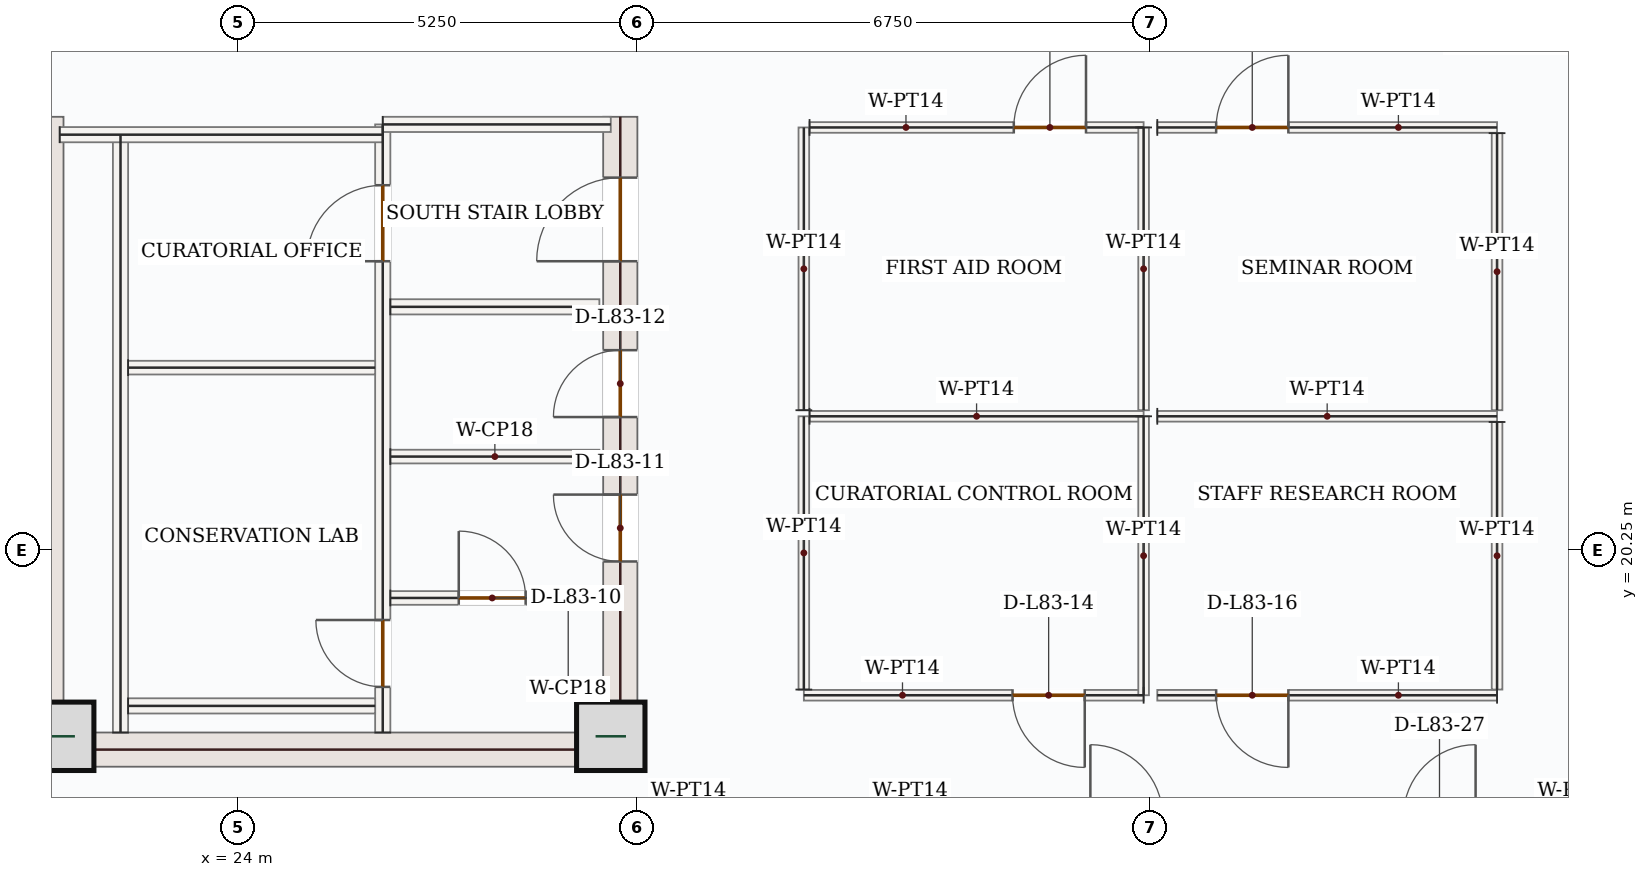
"""IFC4 building model, lengths in metres.
Left out: names, types, materials, properties, quantities, classifications, styles, units other than length and angle.
Written with IfcOpenShell. Run it as: python <this file> out.ifc"""

import sys

from ifc_helpers import new_model, si_unit, direction, frame, frame_2d, origin, origin_2d, place, context, subcontext, project, spatial, rectangle, extrude, source, transform, mapped, element, fill, save


model = new_model("IFC4")
c1 = context("Model", 3, precision=1e-05, world=origin(), true_north=direction((0.0, 1.0)))
c2 = subcontext(c1, "Body", "Model", "MODEL_VIEW")
j1 = project(units=[si_unit("LENGTHUNIT", "METRE"), si_unit("PLANEANGLEUNIT", "RADIAN")], contexts=[c1])
p1 = place(None, origin())
s1 = spatial("IfcSite", under=j1, at=p1, CompositionType="ELEMENT")
p2 = place(p1, origin())
s2 = spatial("IfcBuilding", under=s1, at=p2, CompositionType="ELEMENT")
p3 = place(p2, frame((0.0, 0.0, 342.3)))
s3 = spatial("IfcBuildingStorey", under=s2, at=p3, CompositionType="ELEMENT", Elevation=342.3)
m1 = source(origin(), c2, "Body", "SweptSolid", [
    extrude(rectangle(XDim=8.55, YDim=0.45, at=frame_2d((4.275, 0.0))), origin(), (0.0, 0.0, 1.0), 3.5),
])
p4 = place(p3, frame((21.475, 17.4, 0.0), z_axis=(0.0, 0.0, 1.0), x_axis=(0.0, 1.0, 0.0)))
e1 = element("IfcWall", 1, at=p4, inside=s3, PredefinedType="SHEAR", context=c2, shape_type="MappedRepresentation", body=[
    mapped(m1, transform((0.0, 0.0, 0.0), x_axis=(1.0, 0.0, 0.0), y_axis=(0.0, 1.0, 0.0), z_axis=(0.0, 0.0, 1.0), scale=1.0)),
])
p5 = place(p3, frame((29.025, 17.4, 0.0), z_axis=(0.0, 0.0, 1.0), x_axis=(0.0, 1.0, 0.0)))
e2 = element("IfcWall", 2, at=p5, inside=s3, PredefinedType="SHEAR", context=c2, shape_type="SweptSolid", body=[
    extrude(rectangle(XDim=8.55, YDim=0.45, at=frame_2d((4.275, 0.0))), origin(), (0.0, 0.0, 1.0), 3.5),
])
p6 = place(p5, frame((6.65, 0.0, 0.0)))
e3 = element("IfcOpeningElement", 3, at=p6, cuts=e2, PredefinedType="OPENING", context=c2, shape_type="SweptSolid", body=[
    extrude(rectangle(XDim=1.1, YDim=2.2, at=frame_2d((0.55, 1.1))), frame((0.0, 0.235, 0.0), z_axis=(0.0, -1.0, 0.0), x_axis=(1.0, 0.0, 0.0)), (0.0, 0.0, 1.0), 0.47),
])
p7 = place(p5, frame((2.7, 0.0, 0.0)))
e4 = element("IfcOpeningElement", 4, at=p7, cuts=e2, PredefinedType="OPENING", context=c2, shape_type="SweptSolid", body=[
    extrude(rectangle(XDim=0.88, YDim=2.1, at=frame_2d((0.44, 1.05))), frame((0.0, 0.235, 0.0), z_axis=(0.0, -1.0, 0.0), x_axis=(1.0, 0.0, 0.0)), (0.0, 0.0, 1.0), 0.47),
])
p8 = place(p5, frame((4.6, 0.0, 0.0)))
e5 = element("IfcOpeningElement", 5, at=p8, cuts=e2, PredefinedType="OPENING", context=c2, shape_type="SweptSolid", body=[
    extrude(rectangle(XDim=0.88, YDim=2.1, at=frame_2d((0.44, 1.05))), frame((0.0, 0.235, 0.0), z_axis=(0.0, -1.0, 0.0), x_axis=(1.0, 0.0, 0.0)), (0.0, 0.0, 1.0), 0.47),
])
m2 = source(origin(), c2, "Body", "SweptSolid", [
    extrude(rectangle(XDim=7.1, YDim=0.45, at=frame_2d((3.55, 0.0))), origin(), (0.0, 0.0, 1.0), 3.5),
])
p9 = place(p3, frame((21.7, 17.625, 0.0), z_axis=(0.0, 0.0, 1.0), x_axis=(1.0, 0.0, 0.0)))
e6 = element("IfcWall", 6, at=p9, inside=s3, PredefinedType="SHEAR", context=c2, shape_type="MappedRepresentation", body=[
    mapped(m2, transform((0.0, 0.0, 0.0), x_axis=(1.0, 0.0, 0.0), y_axis=(0.0, 1.0, 0.0), z_axis=(0.0, 0.0, 1.0), scale=1.0)),
])
m3 = source(origin(), c2, "Body", "SweptSolid", [
    extrude(rectangle(XDim=0.9, YDim=0.9, at=origin_2d()), origin(), (0.0, 0.0, 1.0), 3.75),
])
for number, where, z_axis, x_axis in (
    (7, (21.65, 17.8, 0.0), (0.0, 0.0, 1.0), (1.0, 0.0, 0.0)),
    (8, (28.9, 17.8, 0.0), (0.0, 0.0, 1.0), (1.0, 0.0, 0.0)),
):
    element("IfcColumn", number, at=place(p3, frame(where, z_axis=z_axis, x_axis=x_axis)), inside=s3, PredefinedType="COLUMN", context=c2, shape_type="MappedRepresentation", body=[
        mapped(m3, transform((0.0, 0.0, 0.0), x_axis=(1.0, 0.0, 0.0), y_axis=(0.0, 1.0, 0.0), z_axis=(0.0, 0.0, 1.0), scale=1.0)),
    ])
p10 = place(p3, frame((22.167, 14.994, 0.0), z_axis=(0.0, 0.0, 1.0), x_axis=(-0.681733754317, 0.731600361006, 0.0)))
e9 = element("IfcWall", 9, at=p10, inside=s3, PredefinedType="SOLIDWALL", context=c2, shape_type="SweptSolid", body=[
    extrude(rectangle(XDim=4.734, YDim=0.28, at=frame_2d((2.367, 0.0))), origin(), (0.0, 0.0, 1.0), 3.5),
])
p11 = place(p10, frame((1.617, 0.0, 0.85)))
e10 = element("IfcOpeningElement", 10, at=p11, cuts=e9, PredefinedType="OPENING", context=c2, shape_type="SweptSolid", body=[
    extrude(rectangle(XDim=1.5, YDim=1.5, at=frame_2d((0.75, 0.75))), frame((0.0, 0.15, 0.0), z_axis=(0.0, -1.0, 0.0), x_axis=(1.0, 0.0, 0.0)), (0.0, 0.0, 1.0), 0.3),
])
m4 = source(origin(), c2, "Body", "SweptSolid", [
    extrude(rectangle(XDim=7.87, YDim=0.2, at=frame_2d((3.935, 0.0))), origin(), (0.0, 0.0, 1.0), 3.5),
])
p12 = place(p3, frame((22.45, 17.85, 0.0), z_axis=(0.0, 0.0, 1.0), x_axis=(0.0, 1.0, 0.0)))
e11 = element("IfcWall", 11, at=p12, inside=s3, PredefinedType="SOLIDWALL", context=c2, shape_type="MappedRepresentation", body=[
    mapped(m4, transform((0.0, 0.0, 0.0), x_axis=(1.0, 0.0, 0.0), y_axis=(0.0, 1.0, 0.0), z_axis=(0.0, 0.0, 1.0), scale=1.0)),
])
p13 = place(p3, frame((25.9, 17.85, 0.0), z_axis=(0.0, 0.0, 1.0), x_axis=(0.0, 1.0, 0.0)))
e12 = element("IfcWall", 12, at=p13, inside=s3, PredefinedType="SOLIDWALL", context=c2, shape_type="SweptSolid", body=[
    extrude(rectangle(XDim=8.0, YDim=0.2, at=frame_2d((4.0, 0.0))), origin(), (0.0, 0.0, 1.0), 3.5),
])
p14 = place(p13, frame((6.2, 0.0, 0.0)))
e13 = element("IfcOpeningElement", 13, at=p14, cuts=e12, PredefinedType="OPENING", context=c2, shape_type="SweptSolid", body=[
    extrude(rectangle(XDim=1.0, YDim=2.15, at=frame_2d((0.5, 1.075))), frame((0.0, 0.11, 0.0), z_axis=(0.0, -1.0, 0.0), x_axis=(1.0, 0.0, 0.0)), (0.0, 0.0, 1.0), 0.22),
])
p15 = place(p13, frame((0.6, 0.0, 0.0)))
e14 = element("IfcOpeningElement", 14, at=p15, cuts=e12, PredefinedType="OPENING", context=c2, shape_type="SweptSolid", body=[
    extrude(rectangle(XDim=0.88, YDim=2.1, at=frame_2d((0.44, 1.05))), frame((0.0, 0.11, 0.0), z_axis=(0.0, -1.0, 0.0), x_axis=(1.0, 0.0, 0.0)), (0.0, 0.0, 1.0), 0.22),
])
m5 = source(origin(), c2, "Body", "SweptSolid", [
    extrude(rectangle(XDim=4.25, YDim=0.2, at=frame_2d((2.125, 0.0))), origin(), (0.0, 0.0, 1.0), 3.5),
])
p16 = place(p3, frame((21.65, 25.715, 0.0), z_axis=(0.0, 0.0, 1.0), x_axis=(1.0, 0.0, 0.0)))
e15 = element("IfcWall", 15, at=p16, inside=s3, PredefinedType="SOLIDWALL", context=c2, shape_type="MappedRepresentation", body=[
    mapped(m5, transform((0.0, 0.0, 0.0), x_axis=(1.0, 0.0, 0.0), y_axis=(0.0, 1.0, 0.0), z_axis=(0.0, 0.0, 1.0), scale=1.0)),
])
m6 = source(origin(), c2, "Body", "SweptSolid", [
    extrude(rectangle(XDim=3.0, YDim=0.2, at=frame_2d((1.5, 0.0))), origin(), (0.0, 0.0, 1.0), 3.5),
])
p17 = place(p3, frame((25.9, 25.85, 0.0), z_axis=(0.0, 0.0, 1.0), x_axis=(1.0, 0.0, 0.0)))
e16 = element("IfcWall", 16, at=p17, inside=s3, PredefinedType="SOLIDWALL", context=c2, shape_type="MappedRepresentation", body=[
    mapped(m6, transform((0.0, 0.0, 0.0), x_axis=(1.0, 0.0, 0.0), y_axis=(0.0, 1.0, 0.0), z_axis=(0.0, 0.0, 1.0), scale=1.0)),
])
m7 = source(origin(), c2, "Body", "SweptSolid", [
    extrude(rectangle(XDim=3.25, YDim=0.2, at=frame_2d((1.625, 0.0))), origin(), (0.0, 0.0, 1.0), 3.5),
])
p18 = place(p3, frame((22.55, 18.2, 0.0), z_axis=(0.0, 0.0, 1.0), x_axis=(1.0, 0.0, 0.0)))
e17 = element("IfcWall", 17, at=p18, inside=s3, PredefinedType="SOLIDWALL", context=c2, shape_type="MappedRepresentation", body=[
    mapped(m7, transform((0.0, 0.0, 0.0), x_axis=(1.0, 0.0, 0.0), y_axis=(0.0, 1.0, 0.0), z_axis=(0.0, 0.0, 1.0), scale=1.0)),
])
m8 = source(origin(), c2, "Body", "SweptSolid", [
    extrude(rectangle(XDim=3.25, YDim=0.18, at=frame_2d((1.625, 0.0))), origin(), (0.0, 0.0, 1.0), 3.5),
])
p19 = place(p3, frame((22.55, 22.65, 0.0), z_axis=(0.0, 0.0, 1.0), x_axis=(1.0, 0.0, 0.0)))
e18 = element("IfcWall", 18, at=p19, inside=s3, PredefinedType="PARTITIONING", context=c2, shape_type="MappedRepresentation", body=[
    mapped(m8, transform((0.0, 0.0, 0.0), x_axis=(1.0, 0.0, 0.0), y_axis=(0.0, 1.0, 0.0), z_axis=(0.0, 0.0, 1.0), scale=1.0)),
])
m9 = source(origin(), c2, "Body", "SweptSolid", [
    extrude(rectangle(XDim=2.75, YDim=0.2, at=frame_2d((1.375, 0.0))), origin(), (0.0, 0.0, 1.0), 3.5),
])
p20 = place(p3, frame((26.0, 23.45, 0.0), z_axis=(0.0, 0.0, 1.0), x_axis=(1.0, 0.0, 0.0)))
e19 = element("IfcWall", 19, at=p20, inside=s3, PredefinedType="SOLIDWALL", context=c2, shape_type="MappedRepresentation", body=[
    mapped(m9, transform((0.0, 0.0, 0.0), x_axis=(1.0, 0.0, 0.0), y_axis=(0.0, 1.0, 0.0), z_axis=(0.0, 0.0, 1.0), scale=1.0)),
])
p21 = place(p3, frame((26.0, 19.62, 0.0), z_axis=(0.0, 0.0, 1.0), x_axis=(1.0, 0.0, 0.0)))
e20 = element("IfcWall", 20, at=p21, inside=s3, PredefinedType="PARTITIONING", context=c2, shape_type="SweptSolid", body=[
    extrude(rectangle(XDim=2.75, YDim=0.18, at=frame_2d((1.375, 0.0))), origin(), (0.0, 0.0, 1.0), 3.5),
])
p22 = place(p21, frame((0.9, 0.0, 0.0)))
e21 = element("IfcOpeningElement", 21, at=p22, cuts=e20, PredefinedType="OPENING", context=c2, shape_type="SweptSolid", body=[
    extrude(rectangle(XDim=0.88, YDim=2.1, at=frame_2d((0.44, 1.05))), frame((0.0, 0.1, 0.0), z_axis=(0.0, -1.0, 0.0), x_axis=(1.0, 0.0, 0.0)), (0.0, 0.0, 1.0), 0.2),
])
m10 = source(origin(), c2, "Body", "SweptSolid", [
    extrude(rectangle(XDim=2.75, YDim=0.18, at=frame_2d((1.375, 0.0))), origin(), (0.0, 0.0, 1.0), 3.5),
])
p23 = place(p3, frame((26.0, 21.48, 0.0), z_axis=(0.0, 0.0, 1.0), x_axis=(1.0, 0.0, 0.0)))
e22 = element("IfcWall", 22, at=p23, inside=s3, PredefinedType="PARTITIONING", context=c2, shape_type="MappedRepresentation", body=[
    mapped(m10, transform((0.0, 0.0, 0.0), x_axis=(1.0, 0.0, 0.0), y_axis=(0.0, 1.0, 0.0), z_axis=(0.0, 0.0, 1.0), scale=1.0)),
])
p24 = place(p3, frame((35.91, 18.34, 0.0), z_axis=(0.0, 0.0, 1.0), x_axis=(-1.0, 0.0, 0.0)))
e23 = element("IfcWall", 23, at=p24, inside=s3, PredefinedType="PARTITIONING", context=c2, shape_type="SweptSolid", body=[
    extrude(rectangle(XDim=4.47, YDim=0.14, at=frame_2d((2.235, 0.0))), origin(), (0.0, 0.0, 1.0), 3.5),
])
p25 = place(p24, frame((0.774, 0.0, 0.0)))
e24 = element("IfcOpeningElement", 24, at=p25, cuts=e23, PredefinedType="OPENING", context=c2, shape_type="SweptSolid", body=[
    extrude(rectangle(XDim=0.95, YDim=2.15, at=frame_2d((0.475, 1.075))), frame((0.0, 0.08, 0.0), z_axis=(0.0, -1.0, 0.0), x_axis=(1.0, 0.0, 0.0)), (0.0, 0.0, 1.0), 0.16),
])
m11 = source(origin(), c2, "Body", "SweptSolid", [
    extrude(rectangle(XDim=3.595, YDim=0.14, at=frame_2d((1.797, 0.0))), origin(), (0.0, 0.0, 1.0), 3.5),
])
p26 = place(p3, frame((31.44, 18.415, 0.0), z_axis=(0.0, 0.0, 1.0), x_axis=(0.0, 1.0, 0.0)))
e25 = element("IfcWall", 25, at=p26, inside=s3, PredefinedType="PARTITIONING", context=c2, shape_type="MappedRepresentation", body=[
    mapped(m11, transform((0.0, 0.0, 0.0), x_axis=(1.0, 0.0, 0.0), y_axis=(0.0, 1.0, 0.0), z_axis=(0.0, 0.0, 1.0), scale=1.0)),
])
m12 = source(origin(), c2, "Body", "SweptSolid", [
    extrude(rectangle(XDim=4.395, YDim=0.14, at=frame_2d((2.198, 0.0))), origin(), (0.0, 0.0, 1.0), 3.5),
])
p27 = place(p3, frame((31.515, 22.01, 0.0), z_axis=(0.0, 0.0, 1.0), x_axis=(1.0, 0.0, 0.0)))
e26 = element("IfcWall", 26, at=p27, inside=s3, PredefinedType="PARTITIONING", context=c2, shape_type="MappedRepresentation", body=[
    mapped(m12, transform((0.0, 0.0, 0.0), x_axis=(1.0, 0.0, 0.0), y_axis=(0.0, 1.0, 0.0), z_axis=(0.0, 0.0, 1.0), scale=1.0)),
])
m13 = source(origin(), c2, "Body", "SweptSolid", [
    extrude(rectangle(XDim=3.67, YDim=0.14, at=frame_2d((1.835, 0.0))), origin(), (0.0, 0.0, 1.0), 3.5),
])
p28 = place(p3, frame((35.91, 22.01, 0.0), z_axis=(0.0, 0.0, 1.0), x_axis=(0.0, -1.0, 0.0)))
e27 = element("IfcWall", 27, at=p28, inside=s3, PredefinedType="PARTITIONING", context=c2, shape_type="MappedRepresentation", body=[
    mapped(m13, transform((0.0, 0.0, 0.0), x_axis=(1.0, 0.0, 0.0), y_axis=(0.0, 1.0, 0.0), z_axis=(0.0, 0.0, 1.0), scale=1.0)),
])
p29 = place(p3, frame((40.56, 18.34, 0.0), z_axis=(0.0, 0.0, 1.0), x_axis=(-1.0, 0.0, 0.0)))
e28 = element("IfcWall", 28, at=p29, inside=s3, PredefinedType="PARTITIONING", context=c2, shape_type="SweptSolid", body=[
    extrude(rectangle(XDim=4.47, YDim=0.14, at=frame_2d((2.235, 0.0))), origin(), (0.0, 0.0, 1.0), 3.5),
])
p30 = place(p29, frame((2.746, 0.0, 0.0)))
e29 = element("IfcOpeningElement", 29, at=p30, cuts=e28, PredefinedType="OPENING", context=c2, shape_type="SweptSolid", body=[
    extrude(rectangle(XDim=0.95, YDim=2.15, at=frame_2d((0.475, 1.075))), frame((0.0, 0.08, 0.0), z_axis=(0.0, -1.0, 0.0), x_axis=(1.0, 0.0, 0.0)), (0.0, 0.0, 1.0), 0.16),
])
m14 = source(origin(), c2, "Body", "SweptSolid", [
    extrude(rectangle(XDim=4.47, YDim=0.14, at=frame_2d((2.235, 0.0))), origin(), (0.0, 0.0, 1.0), 3.5),
])
p31 = place(p3, frame((36.09, 22.01, 0.0), z_axis=(0.0, 0.0, 1.0), x_axis=(1.0, 0.0, 0.0)))
e30 = element("IfcWall", 30, at=p31, inside=s3, PredefinedType="PARTITIONING", context=c2, shape_type="MappedRepresentation", body=[
    mapped(m14, transform((0.0, 0.0, 0.0), x_axis=(1.0, 0.0, 0.0), y_axis=(0.0, 1.0, 0.0), z_axis=(0.0, 0.0, 1.0), scale=1.0)),
])
m15 = source(origin(), c2, "Body", "SweptSolid", [
    extrude(rectangle(XDim=3.52, YDim=0.14, at=frame_2d((1.76, 0.0))), origin(), (0.0, 0.0, 1.0), 3.5),
])
p32 = place(p3, frame((40.56, 21.935, 0.0), z_axis=(0.0, 0.0, 1.0), x_axis=(0.0, -1.0, 0.0)))
e31 = element("IfcWall", 31, at=p32, inside=s3, PredefinedType="PARTITIONING", context=c2, shape_type="MappedRepresentation", body=[
    mapped(m15, transform((0.0, 0.0, 0.0), x_axis=(1.0, 0.0, 0.0), y_axis=(0.0, 1.0, 0.0), z_axis=(0.0, 0.0, 1.0), scale=1.0)),
])
m16 = source(origin(), c2, "Body", "SweptSolid", [
    extrude(rectangle(XDim=3.72, YDim=0.14, at=frame_2d((1.86, 0.0))), origin(), (0.0, 0.0, 1.0), 3.5),
])
p33 = place(p3, frame((31.44, 22.09, 0.0), z_axis=(0.0, 0.0, 1.0), x_axis=(0.0, 1.0, 0.0)))
e32 = element("IfcWall", 32, at=p33, inside=s3, PredefinedType="PARTITIONING", context=c2, shape_type="MappedRepresentation", body=[
    mapped(m16, transform((0.0, 0.0, 0.0), x_axis=(1.0, 0.0, 0.0), y_axis=(0.0, 1.0, 0.0), z_axis=(0.0, 0.0, 1.0), scale=1.0)),
])
p34 = place(p3, frame((31.515, 25.81, 0.0), z_axis=(0.0, 0.0, 1.0), x_axis=(1.0, 0.0, 0.0)))
e33 = element("IfcWall", 33, at=p34, inside=s3, PredefinedType="PARTITIONING", context=c2, shape_type="SweptSolid", body=[
    extrude(rectangle(XDim=4.395, YDim=0.14, at=frame_2d((2.198, 0.0))), origin(), (0.0, 0.0, 1.0), 3.5),
])
p35 = place(p34, frame((2.687, 0.0, 0.0)))
e34 = element("IfcOpeningElement", 34, at=p35, cuts=e33, PredefinedType="OPENING", context=c2, shape_type="SweptSolid", body=[
    extrude(rectangle(XDim=0.95, YDim=2.15, at=frame_2d((0.475, 1.075))), frame((0.0, 0.08, 0.0), z_axis=(0.0, -1.0, 0.0), x_axis=(1.0, 0.0, 0.0)), (0.0, 0.0, 1.0), 0.16),
])
p36 = place(p3, frame((35.91, 25.81, 0.0), z_axis=(0.0, 0.0, 1.0), x_axis=(0.0, -1.0, 0.0)))
e35 = element("IfcWall", 35, at=p36, inside=s3, PredefinedType="PARTITIONING", context=c2, shape_type="MappedRepresentation", body=[
    mapped(m16, transform((0.0, 0.0, 0.0), x_axis=(1.0, 0.0, 0.0), y_axis=(0.0, 1.0, 0.0), z_axis=(0.0, 0.0, 1.0), scale=1.0)),
])
p37 = place(p3, frame((36.09, 25.81, 0.0), z_axis=(0.0, 0.0, 1.0), x_axis=(1.0, 0.0, 0.0)))
e36 = element("IfcWall", 36, at=p37, inside=s3, PredefinedType="PARTITIONING", context=c2, shape_type="SweptSolid", body=[
    extrude(rectangle(XDim=4.47, YDim=0.14, at=frame_2d((2.235, 0.0))), origin(), (0.0, 0.0, 1.0), 3.5),
])
p38 = place(p37, frame((0.774, 0.0, 0.0)))
e37 = element("IfcOpeningElement", 37, at=p38, cuts=e36, PredefinedType="OPENING", context=c2, shape_type="SweptSolid", body=[
    extrude(rectangle(XDim=0.95, YDim=2.15, at=frame_2d((0.475, 1.075))), frame((0.0, 0.08, 0.0), z_axis=(0.0, -1.0, 0.0), x_axis=(1.0, 0.0, 0.0)), (0.0, 0.0, 1.0), 0.16),
])
m17 = source(origin(), c2, "Body", "SweptSolid", [
    extrude(rectangle(XDim=3.645, YDim=0.14, at=frame_2d((1.823, 0.0))), origin(), (0.0, 0.0, 1.0), 3.5),
])
p39 = place(p3, frame((40.56, 25.735, 0.0), z_axis=(0.0, 0.0, 1.0), x_axis=(0.0, -1.0, 0.0)))
e38 = element("IfcWall", 38, at=p39, inside=s3, PredefinedType="PARTITIONING", context=c2, shape_type="MappedRepresentation", body=[
    mapped(m17, transform((0.0, 0.0, 0.0), x_axis=(1.0, 0.0, 0.0), y_axis=(0.0, 1.0, 0.0), z_axis=(0.0, 0.0, 1.0), scale=1.0)),
])
m18 = source(origin(), c2, "Body", "SweptSolid", [
    extrude(rectangle(XDim=1.0, YDim=2.15, at=frame_2d((0.5, 1.075))), frame((0.0, 0.025, 0.0), z_axis=(0.0, -1.0, 0.0), x_axis=(1.0, 0.0, 0.0)), (0.0, 0.0, 1.0), 0.05),
])
p40 = place(p14, origin())
e39 = element("IfcDoor", 39, at=p40, inside=s3, OperationType="SINGLE_SWING_LEFT", PredefinedType="DOOR", context=c2, shape_type="MappedRepresentation", body=[
    mapped(m18, transform((0.0, 0.0, 0.0), x_axis=(1.0, 0.0, 0.0), y_axis=(0.0, 1.0, 0.0), z_axis=(0.0, 0.0, 1.0), scale=1.0)),
])
fill(e13, e39)
m19 = source(origin(), c2, "Body", "SweptSolid", [
    extrude(rectangle(XDim=0.88, YDim=2.1, at=frame_2d((0.44, 1.05))), frame((0.0, 0.025, 0.0), z_axis=(0.0, -1.0, 0.0), x_axis=(1.0, 0.0, 0.0)), (0.0, 0.0, 1.0), 0.05),
])
p41 = place(p15, origin())
e40 = element("IfcDoor", 40, at=p41, inside=s3, OperationType="SINGLE_SWING_RIGHT", PredefinedType="DOOR", context=c2, shape_type="MappedRepresentation", body=[
    mapped(m19, transform((0.0, 0.0, 0.0), x_axis=(1.0, 0.0, 0.0), y_axis=(0.0, 1.0, 0.0), z_axis=(0.0, 0.0, 1.0), scale=1.0)),
])
fill(e14, e40)
m20 = source(origin(), c2, "Body", "SweptSolid", [
    extrude(rectangle(XDim=1.1, YDim=2.2, at=frame_2d((0.55, 1.1))), frame((0.0, 0.025, 0.0), z_axis=(0.0, -1.0, 0.0), x_axis=(1.0, 0.0, 0.0)), (0.0, 0.0, 1.0), 0.05),
])
p42 = place(p6, origin())
e41 = element("IfcDoor", 41, at=p42, inside=s3, OperationType="SINGLE_SWING_LEFT", PredefinedType="DOOR", context=c2, shape_type="MappedRepresentation", body=[
    mapped(m20, transform((0.0, 0.0, 0.0), x_axis=(1.0, 0.0, 0.0), y_axis=(0.0, 1.0, 0.0), z_axis=(0.0, 0.0, 1.0), scale=1.0)),
])
fill(e3, e41)
p43 = place(p22, origin())
e42 = element("IfcDoor", 42, at=p43, inside=s3, OperationType="SINGLE_SWING_LEFT", PredefinedType="DOOR", context=c2, shape_type="MappedRepresentation", body=[
    mapped(m19, transform((0.0, 0.0, 0.0), x_axis=(1.0, 0.0, 0.0), y_axis=(0.0, 1.0, 0.0), z_axis=(0.0, 0.0, 1.0), scale=1.0)),
])
fill(e21, e42)
p44 = place(p7, origin())
e43 = element("IfcDoor", 43, at=p44, inside=s3, OperationType="SINGLE_SWING_RIGHT", PredefinedType="DOOR", context=c2, shape_type="MappedRepresentation", body=[
    mapped(m19, transform((0.0, 0.0, 0.0), x_axis=(1.0, 0.0, 0.0), y_axis=(0.0, 1.0, 0.0), z_axis=(0.0, 0.0, 1.0), scale=1.0)),
])
fill(e4, e43)
p45 = place(p8, origin())
e44 = element("IfcDoor", 44, at=p45, inside=s3, OperationType="SINGLE_SWING_LEFT", PredefinedType="DOOR", context=c2, shape_type="MappedRepresentation", body=[
    mapped(m19, transform((0.0, 0.0, 0.0), x_axis=(1.0, 0.0, 0.0), y_axis=(0.0, 1.0, 0.0), z_axis=(0.0, 0.0, 1.0), scale=1.0)),
])
fill(e5, e44)
m21 = source(origin(), c2, "Body", "SweptSolid", [
    extrude(rectangle(XDim=0.95, YDim=2.15, at=frame_2d((0.475, 1.075))), frame((0.0, 0.025, 0.0), z_axis=(0.0, -1.0, 0.0), x_axis=(1.0, 0.0, 0.0)), (0.0, 0.0, 1.0), 0.05),
])
p46 = place(p25, origin())
e45 = element("IfcDoor", 45, at=p46, inside=s3, OperationType="SINGLE_SWING_LEFT", PredefinedType="DOOR", context=c2, shape_type="MappedRepresentation", body=[
    mapped(m21, transform((0.0, 0.0, 0.0), x_axis=(1.0, 0.0, 0.0), y_axis=(0.0, 1.0, 0.0), z_axis=(0.0, 0.0, 1.0), scale=1.0)),
])
fill(e24, e45)
p47 = place(p35, origin())
e46 = element("IfcDoor", 46, at=p47, inside=s3, OperationType="SINGLE_SWING_RIGHT", PredefinedType="DOOR", context=c2, shape_type="MappedRepresentation", body=[
    mapped(m21, transform((0.0, 0.0, 0.0), x_axis=(1.0, 0.0, 0.0), y_axis=(0.0, 1.0, 0.0), z_axis=(0.0, 0.0, 1.0), scale=1.0)),
])
fill(e34, e46)
p48 = place(p30, origin())
e47 = element("IfcDoor", 47, at=p48, inside=s3, OperationType="SINGLE_SWING_LEFT", PredefinedType="DOOR", context=c2, shape_type="MappedRepresentation", body=[
    mapped(m21, transform((0.0, 0.0, 0.0), x_axis=(1.0, 0.0, 0.0), y_axis=(0.0, 1.0, 0.0), z_axis=(0.0, 0.0, 1.0), scale=1.0)),
])
fill(e29, e47)
p49 = place(p38, origin())
e48 = element("IfcDoor", 48, at=p49, inside=s3, OperationType="SINGLE_SWING_RIGHT", PredefinedType="DOOR", context=c2, shape_type="MappedRepresentation", body=[
    mapped(m21, transform((0.0, 0.0, 0.0), x_axis=(1.0, 0.0, 0.0), y_axis=(0.0, 1.0, 0.0), z_axis=(0.0, 0.0, 1.0), scale=1.0)),
])
fill(e37, e48)
save(model, sys.argv[1])
